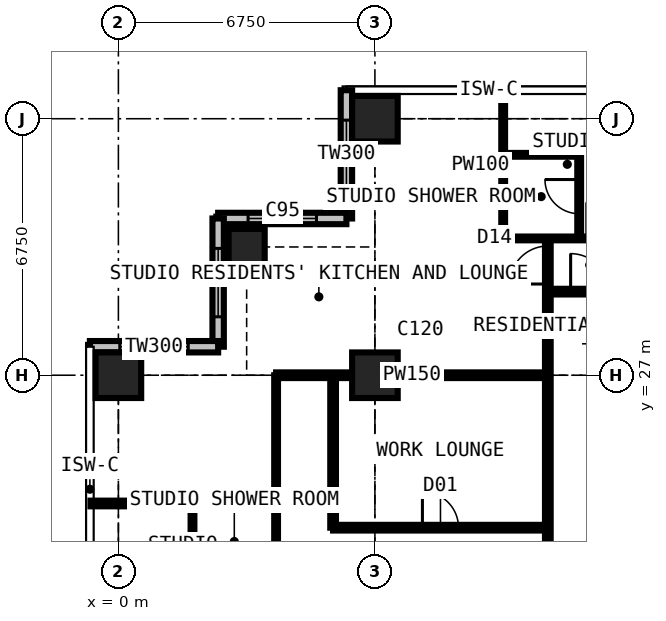
"""IFC4 building model, lengths in metres.
Left out: names, types, materials, properties, quantities, classifications, styles, units other than length and angle.
Written with IfcOpenShell. Run it as: python <this file> out.ifc"""

import sys

from ifc_helpers import new_model, si_unit, direction, frame, frame_2d, origin, origin_2d, place, context, subcontext, project, spatial, rectangle, extrude, element, fill, save


model = new_model("IFC4")
c1 = context("Model", 3, precision=1e-05, world=origin(), true_north=direction((0.0, 1.0)))
c2 = subcontext(c1, "Body", "Model", "MODEL_VIEW")
j1 = project(units=[si_unit("LENGTHUNIT", "METRE"), si_unit("PLANEANGLEUNIT", "RADIAN")], contexts=[c1])
p1 = place(None, origin())
s1 = spatial("IfcSite", under=j1, at=p1, CompositionType="ELEMENT")
p2 = place(p1, origin())
s2 = spatial("IfcBuilding", under=s1, at=p2, CompositionType="ELEMENT")
p3 = place(p2, frame((0.0, 0.0, 185.4)))
s3 = spatial("IfcBuildingStorey", under=s2, at=p3, CompositionType="ELEMENT", Elevation=185.4)
p4 = place(p3, frame((0.0, 27.0, 0.0), z_axis=(0.0, 0.0, 1.0), x_axis=(1.0, 0.0, 0.0)))
e1 = element("IfcColumn", 1, at=p4, inside=s3, PredefinedType="COLUMN", context=c2, shape_type="SweptSolid", body=[
    extrude(rectangle(XDim=1.2, YDim=1.2, at=origin_2d()), origin(), (0.0, 0.0, 1.0), 3.6),
])
p5 = place(p3, frame((3.375, 30.375, 0.0), z_axis=(0.0, 0.0, 1.0), x_axis=(1.0, 0.0, 0.0)))
e2 = element("IfcColumn", 2, at=p5, inside=s3, PredefinedType="COLUMN", context=c2, shape_type="SweptSolid", body=[
    extrude(rectangle(XDim=0.95, YDim=0.95, at=origin_2d()), origin(), (0.0, 0.0, 1.0), 3.6),
])
for number, where, z_axis, x_axis in (
    (3, (6.75, 27.0, 0.0), (0.0, 0.0, 1.0), (1.0, 0.0, 0.0)),
    (4, (6.75, 33.75, 0.0), (0.0, 0.0, 1.0), (1.0, 0.0, 0.0)),
):
    element("IfcColumn", number, at=place(p3, frame(where, z_axis=z_axis, x_axis=x_axis)), inside=s3, PredefinedType="COLUMN", context=c2, shape_type="SweptSolid", body=[
        extrude(rectangle(XDim=1.2, YDim=1.2, at=origin_2d()), origin(), (0.0, 0.0, 1.0), 3.6),
    ])
p6 = place(p3, frame((6.0, 34.5, 0.0), z_axis=(0.0, 0.0, 1.0), x_axis=(0.0, -1.0, 0.0)))
e5 = element("IfcWall", 5, at=p6, inside=s3, PredefinedType="SOLIDWALL", context=c2, shape_type="SweptSolid", body=[
    extrude(rectangle(XDim=3.375, YDim=0.3, at=frame_2d((1.688, 0.0))), origin(), (0.0, 0.0, 1.0), 3.375),
])
p7 = place(p6, frame((0.788, 0.0, 0.6)))
e6 = element("IfcOpeningElement", 6, at=p7, cuts=e5, PredefinedType="OPENING", context=c2, shape_type="SweptSolid", body=[
    extrude(rectangle(XDim=1.8, YDim=2.1, at=frame_2d((0.9, 1.05))), frame((0.0, 0.16, 0.0), z_axis=(0.0, -1.0, 0.0), x_axis=(1.0, 0.0, 0.0)), (0.0, 0.0, 1.0), 0.32),
])
p8 = place(p3, frame((6.0, 31.125, 0.0), z_axis=(0.0, 0.0, 1.0), x_axis=(-1.0, 0.0, 0.0)))
e7 = element("IfcWall", 7, at=p8, inside=s3, PredefinedType="SOLIDWALL", context=c2, shape_type="SweptSolid", body=[
    extrude(rectangle(XDim=3.375, YDim=0.3, at=frame_2d((1.688, 0.0))), origin(), (0.0, 0.0, 1.0), 3.375),
])
p9 = place(p8, frame((0.788, 0.0, 0.6)))
e8 = element("IfcOpeningElement", 8, at=p9, cuts=e7, PredefinedType="OPENING", context=c2, shape_type="SweptSolid", body=[
    extrude(rectangle(XDim=1.8, YDim=2.1, at=frame_2d((0.9, 1.05))), frame((0.0, 0.16, 0.0), z_axis=(0.0, -1.0, 0.0), x_axis=(1.0, 0.0, 0.0)), (0.0, 0.0, 1.0), 0.32),
])
p10 = place(p3, frame((2.625, 31.125, 0.0), z_axis=(0.0, 0.0, 1.0), x_axis=(0.0, -1.0, 0.0)))
e9 = element("IfcWall", 9, at=p10, inside=s3, PredefinedType="SOLIDWALL", context=c2, shape_type="SweptSolid", body=[
    extrude(rectangle(XDim=3.375, YDim=0.3, at=frame_2d((1.688, 0.0))), origin(), (0.0, 0.0, 1.0), 3.375),
])
p11 = place(p10, frame((0.788, 0.0, 0.6)))
e10 = element("IfcOpeningElement", 10, at=p11, cuts=e9, PredefinedType="OPENING", context=c2, shape_type="SweptSolid", body=[
    extrude(rectangle(XDim=1.8, YDim=2.1, at=frame_2d((0.9, 1.05))), frame((0.0, 0.16, 0.0), z_axis=(0.0, -1.0, 0.0), x_axis=(1.0, 0.0, 0.0)), (0.0, 0.0, 1.0), 0.32),
])
p12 = place(p3, frame((2.625, 27.75, 0.0), z_axis=(0.0, 0.0, 1.0), x_axis=(-1.0, 0.0, 0.0)))
e11 = element("IfcWall", 11, at=p12, inside=s3, PredefinedType="SOLIDWALL", context=c2, shape_type="SweptSolid", body=[
    extrude(rectangle(XDim=3.375, YDim=0.3, at=frame_2d((1.688, 0.0))), origin(), (0.0, 0.0, 1.0), 3.375),
])
p13 = place(p12, frame((0.788, 0.0, 0.6)))
e12 = element("IfcOpeningElement", 12, at=p13, cuts=e11, PredefinedType="OPENING", context=c2, shape_type="SweptSolid", body=[
    extrude(rectangle(XDim=1.8, YDim=2.1, at=frame_2d((0.9, 1.05))), frame((0.0, 0.16, 0.0), z_axis=(0.0, -1.0, 0.0), x_axis=(1.0, 0.0, 0.0)), (0.0, 0.0, 1.0), 0.32),
])
p14 = place(p3, frame((-0.734, 23.625, 0.0), z_axis=(0.0, 0.0, 1.0), x_axis=(1.0, 0.0, 0.0)))
e13 = element("IfcWall", 13, at=p14, inside=s3, PredefinedType="PARTITIONING", context=c2, shape_type="SweptSolid", body=[
    extrude(rectangle(XDim=4.884, YDim=0.15, at=frame_2d((2.442, 0.0))), origin(), (0.0, 0.0, 1.0), 3.375),
])
p15 = place(p3, frame((1.95, 21.625, 0.0), z_axis=(0.0, 0.0, 1.0), x_axis=(0.0, 1.0, 0.0)))
e14 = element("IfcWall", 14, at=p15, inside=s3, PredefinedType="PARTITIONING", context=c2, shape_type="SweptSolid", body=[
    extrude(rectangle(XDim=2.0, YDim=0.1, at=frame_2d((1.0, 0.0))), origin(), (0.0, 0.0, 1.0), 3.375),
])
p16 = place(p3, frame((4.15, 10.125, 0.0), z_axis=(0.0, 0.0, 1.0), x_axis=(0.0, 1.0, 0.0)))
e15 = element("IfcWall", 15, at=p16, inside=s3, PredefinedType="PARTITIONING", context=c2, shape_type="SweptSolid", body=[
    extrude(rectangle(XDim=16.875, YDim=0.1, at=frame_2d((8.438, 0.0))), origin(), (0.0, 0.0, 1.0), 3.375),
])
p17 = place(p16, frame((0.2, 0.0, 0.0)))
e16 = element("IfcOpeningElement", 16, at=p17, cuts=e15, PredefinedType="OPENING", context=c2, shape_type="SweptSolid", body=[
    extrude(rectangle(XDim=0.95, YDim=2.2, at=frame_2d((0.475, 1.1))), frame((0.0, 0.06, 0.0), z_axis=(0.0, -1.0, 0.0), x_axis=(1.0, 0.0, 0.0)), (0.0, 0.0, 1.0), 0.12),
])
p18 = place(p16, frame((3.625, 0.0, 0.0)))
e17 = element("IfcOpeningElement", 17, at=p18, cuts=e15, PredefinedType="OPENING", context=c2, shape_type="SweptSolid", body=[
    extrude(rectangle(XDim=0.95, YDim=2.2, at=frame_2d((0.475, 1.1))), frame((0.0, 0.06, 0.0), z_axis=(0.0, -1.0, 0.0), x_axis=(1.0, 0.0, 0.0)), (0.0, 0.0, 1.0), 0.12),
])
p19 = place(p16, frame((7.0, 0.0, 0.0)))
e18 = element("IfcOpeningElement", 18, at=p19, cuts=e15, PredefinedType="OPENING", context=c2, shape_type="SweptSolid", body=[
    extrude(rectangle(XDim=0.95, YDim=2.2, at=frame_2d((0.475, 1.1))), frame((0.0, 0.06, 0.0), z_axis=(0.0, -1.0, 0.0), x_axis=(1.0, 0.0, 0.0)), (0.0, 0.0, 1.0), 0.12),
])
p20 = place(p16, frame((10.375, 0.0, 0.0)))
e19 = element("IfcOpeningElement", 19, at=p20, cuts=e15, PredefinedType="OPENING", context=c2, shape_type="SweptSolid", body=[
    extrude(rectangle(XDim=0.95, YDim=2.2, at=frame_2d((0.475, 1.1))), frame((0.0, 0.06, 0.0), z_axis=(0.0, -1.0, 0.0), x_axis=(1.0, 0.0, 0.0)), (0.0, 0.0, 1.0), 0.12),
])
p21 = place(p3, frame((4.15, 27.0, 0.0), z_axis=(0.0, 0.0, 1.0), x_axis=(1.0, 0.0, 0.0)))
e20 = element("IfcWall", 20, at=p21, inside=s3, PredefinedType="PARTITIONING", context=c2, shape_type="SweptSolid", body=[
    extrude(rectangle(XDim=7.15, YDim=0.15, at=frame_2d((3.575, 0.0))), origin(), (0.0, 0.0, 1.0), 2.806),
])
p22 = place(p3, frame((5.65, 22.988, 0.0), z_axis=(0.0, 0.0, 1.0), x_axis=(0.0, 1.0, 0.0)))
e21 = element("IfcWall", 21, at=p22, inside=s3, PredefinedType="PARTITIONING", context=c2, shape_type="SweptSolid", body=[
    extrude(rectangle(XDim=4.012, YDim=0.15, at=frame_2d((2.006, 0.0))), origin(), (0.0, 0.0, 1.0), 3.375),
])
p23 = place(p3, frame((5.65, 22.988, 0.0), z_axis=(0.0, 0.0, 1.0), x_axis=(1.0, 0.0, 0.0)))
e22 = element("IfcWall", 22, at=p23, inside=s3, PredefinedType="PARTITIONING", context=c2, shape_type="SweptSolid", body=[
    extrude(rectangle(XDim=5.65, YDim=0.15, at=frame_2d((2.825, 0.0))), origin(), (0.0, 0.0, 1.0), 3.375),
])
p24 = place(p23, frame((2.35, 0.0, 0.0)))
e23 = element("IfcOpeningElement", 23, at=p24, cuts=e22, PredefinedType="OPENING", context=c2, shape_type="SweptSolid", body=[
    extrude(rectangle(XDim=0.95, YDim=2.2, at=frame_2d((0.475, 1.1))), frame((0.0, 0.085, 0.0), z_axis=(0.0, -1.0, 0.0), x_axis=(1.0, 0.0, 0.0)), (0.0, 0.0, 1.0), 0.17),
])
p25 = place(p3, frame((10.125, 30.6, 0.0), z_axis=(0.0, 0.0, 1.0), x_axis=(0.0, 1.0, 0.0)))
e24 = element("IfcWall", 24, at=p25, inside=s3, PredefinedType="PARTITIONING", context=c2, shape_type="SweptSolid", body=[
    extrude(rectangle(XDim=3.884, YDim=0.1, at=frame_2d((1.942, 0.0))), origin(), (0.0, 0.0, 1.0), 3.375),
])
p26 = place(p3, frame((10.125, 30.6, 0.0), z_axis=(0.0, 0.0, 1.0), x_axis=(1.0, 0.0, 0.0)))
e25 = element("IfcWall", 25, at=p26, inside=s3, PredefinedType="PARTITIONING", context=c2, shape_type="SweptSolid", body=[
    extrude(rectangle(XDim=3.375, YDim=0.1, at=frame_2d((1.688, 0.0))), origin(), (0.0, 0.0, 1.0), 3.375),
])
p27 = place(p26, frame((2.2, 0.0, 0.0)))
e26 = element("IfcOpeningElement", 26, at=p27, cuts=e25, PredefinedType="OPENING", context=c2, shape_type="SweptSolid", body=[
    extrude(rectangle(XDim=0.95, YDim=2.2, at=frame_2d((0.475, 1.1))), frame((0.0, 0.06, 0.0), z_axis=(0.0, -1.0, 0.0), x_axis=(1.0, 0.0, 0.0)), (0.0, 0.0, 1.0), 0.12),
])
p28 = place(p3, frame((10.125, 32.8, 0.0), z_axis=(0.0, 0.0, 1.0), x_axis=(1.0, 0.0, 0.0)))
e27 = element("IfcWall", 27, at=p28, inside=s3, PredefinedType="PARTITIONING", context=c2, shape_type="SweptSolid", body=[
    extrude(rectangle(XDim=2.0, YDim=0.1, at=frame_2d((1.0, 0.0))), origin(), (0.0, 0.0, 1.0), 3.375),
])
p29 = place(p3, frame((11.3, 11.3, 0.0), z_axis=(0.0, 0.0, 1.0), x_axis=(0.0, 1.0, 0.0)))
e28 = element("IfcWall", 28, at=p29, inside=s3, PredefinedType="PARTITIONING", context=c2, shape_type="SweptSolid", body=[
    extrude(rectangle(XDim=19.3, YDim=0.15, at=frame_2d((9.65, 0.0))), origin(), (0.0, 0.0, 1.0), 3.375),
])
p30 = place(p29, frame((18.1, 0.0, 0.0)))
e29 = element("IfcOpeningElement", 29, at=p30, cuts=e28, PredefinedType="OPENING", context=c2, shape_type="SweptSolid", body=[
    extrude(rectangle(XDim=1.0, YDim=2.2, at=frame_2d((0.5, 1.1))), frame((0.0, 0.085, 0.0), z_axis=(0.0, -1.0, 0.0), x_axis=(1.0, 0.0, 0.0)), (0.0, 0.0, 1.0), 0.17),
])
p31 = place(p29, frame((10.137, 0.0, 0.0)))
e30 = element("IfcOpeningElement", 30, at=p31, cuts=e28, PredefinedType="OPENING", context=c2, shape_type="SweptSolid", body=[
    extrude(rectangle(XDim=1.0, YDim=2.2, at=frame_2d((0.5, 1.1))), frame((0.0, 0.085, 0.0), z_axis=(0.0, -1.0, 0.0), x_axis=(1.0, 0.0, 0.0)), (0.0, 0.0, 1.0), 0.17),
])
p32 = place(p3, frame((11.3, 29.2, 0.0), z_axis=(0.0, 0.0, 1.0), x_axis=(1.0, 0.0, 0.0)))
e31 = element("IfcWall", 31, at=p32, inside=s3, PredefinedType="PARTITIONING", context=c2, shape_type="SweptSolid", body=[
    extrude(rectangle(XDim=19.809, YDim=0.15, at=frame_2d((9.904, 0.0))), origin(), (0.0, 0.0, 1.0), 3.375),
])
p33 = place(p32, frame((14.625, 0.0, 0.0)))
e32 = element("IfcOpeningElement", 32, at=p33, cuts=e31, PredefinedType="OPENING", context=c2, shape_type="SweptSolid", body=[
    extrude(rectangle(XDim=1.0, YDim=2.2, at=frame_2d((0.5, 1.1))), frame((0.0, 0.085, 0.0), z_axis=(0.0, -1.0, 0.0), x_axis=(1.0, 0.0, 0.0)), (0.0, 0.0, 1.0), 0.17),
])
p34 = place(p32, frame((5.825, 0.0, 0.0)))
e33 = element("IfcOpeningElement", 33, at=p34, cuts=e31, PredefinedType="OPENING", context=c2, shape_type="SweptSolid", body=[
    extrude(rectangle(XDim=0.95, YDim=2.2, at=frame_2d((0.475, 1.1))), frame((0.0, 0.085, 0.0), z_axis=(0.0, -1.0, 0.0), x_axis=(1.0, 0.0, 0.0)), (0.0, 0.0, 1.0), 0.17),
])
p35 = place(p32, frame((9.2, 0.0, 0.0)))
e34 = element("IfcOpeningElement", 34, at=p35, cuts=e31, PredefinedType="OPENING", context=c2, shape_type="SweptSolid", body=[
    extrude(rectangle(XDim=0.95, YDim=2.2, at=frame_2d((0.475, 1.1))), frame((0.0, 0.085, 0.0), z_axis=(0.0, -1.0, 0.0), x_axis=(1.0, 0.0, 0.0)), (0.0, 0.0, 1.0), 0.17),
])
p36 = place(p32, frame((0.6, 0.0, 0.0)))
e35 = element("IfcOpeningElement", 35, at=p36, cuts=e31, PredefinedType="OPENING", context=c2, shape_type="SweptSolid", body=[
    extrude(rectangle(XDim=1.0, YDim=2.2, at=frame_2d((0.5, 1.1))), frame((0.0, 0.085, 0.0), z_axis=(0.0, -1.0, 0.0), x_axis=(1.0, 0.0, 0.0)), (0.0, 0.0, 1.0), 0.17),
])
p37 = place(p3, frame((12.125, 30.6, 0.0), z_axis=(0.0, 0.0, 1.0), x_axis=(0.0, 1.0, 0.0)))
e36 = element("IfcWall", 36, at=p37, inside=s3, PredefinedType="PARTITIONING", context=c2, shape_type="SweptSolid", body=[
    extrude(rectangle(XDim=2.2, YDim=0.1, at=frame_2d((1.1, 0.0))), origin(), (0.0, 0.0, 1.0), 3.375),
])
p38 = place(p37, frame((0.65, 0.0, 0.0)))
e37 = element("IfcOpeningElement", 37, at=p38, cuts=e36, PredefinedType="OPENING", context=c2, shape_type="SweptSolid", body=[
    extrude(rectangle(XDim=0.9, YDim=2.2, at=frame_2d((0.45, 1.1))), frame((0.0, 0.06, 0.0), z_axis=(0.0, -1.0, 0.0), x_axis=(1.0, 0.0, 0.0)), (0.0, 0.0, 1.0), 0.12),
])
p39 = place(p7, origin())
e38 = element("IfcWindow", 38, at=p39, inside=s3, PartitioningType="SINGLE_PANEL", PredefinedType="WINDOW", context=c2, shape_type="SweptSolid", body=[
    extrude(rectangle(XDim=1.8, YDim=2.1, at=frame_2d((0.9, 1.05))), frame((0.0, 0.03, 0.0), z_axis=(0.0, -1.0, 0.0), x_axis=(1.0, 0.0, 0.0)), (0.0, 0.0, 1.0), 0.06),
])
fill(e6, e38)
p40 = place(p9, origin())
e39 = element("IfcWindow", 39, at=p40, inside=s3, PartitioningType="SINGLE_PANEL", PredefinedType="WINDOW", context=c2, shape_type="SweptSolid", body=[
    extrude(rectangle(XDim=1.8, YDim=2.1, at=frame_2d((0.9, 1.05))), frame((0.0, 0.03, 0.0), z_axis=(0.0, -1.0, 0.0), x_axis=(1.0, 0.0, 0.0)), (0.0, 0.0, 1.0), 0.06),
])
fill(e8, e39)
p41 = place(p11, origin())
e40 = element("IfcWindow", 40, at=p41, inside=s3, PartitioningType="SINGLE_PANEL", PredefinedType="WINDOW", context=c2, shape_type="SweptSolid", body=[
    extrude(rectangle(XDim=1.8, YDim=2.1, at=frame_2d((0.9, 1.05))), frame((0.0, 0.03, 0.0), z_axis=(0.0, -1.0, 0.0), x_axis=(1.0, 0.0, 0.0)), (0.0, 0.0, 1.0), 0.06),
])
fill(e10, e40)
p42 = place(p13, origin())
e41 = element("IfcWindow", 41, at=p42, inside=s3, PartitioningType="SINGLE_PANEL", PredefinedType="WINDOW", context=c2, shape_type="SweptSolid", body=[
    extrude(rectangle(XDim=1.8, YDim=2.1, at=frame_2d((0.9, 1.05))), frame((0.0, 0.03, 0.0), z_axis=(0.0, -1.0, 0.0), x_axis=(1.0, 0.0, 0.0)), (0.0, 0.0, 1.0), 0.06),
])
fill(e12, e41)
p43 = place(p38, origin())
e42 = element("IfcDoor", 42, at=p43, inside=s3, OperationType="SINGLE_SWING_RIGHT", PredefinedType="DOOR", context=c2, shape_type="SweptSolid", body=[
    extrude(rectangle(XDim=0.9, YDim=2.2, at=frame_2d((0.45, 1.1))), frame((0.0, 0.025, 0.0), z_axis=(0.0, -1.0, 0.0), x_axis=(1.0, 0.0, 0.0)), (0.0, 0.0, 1.0), 0.05),
])
fill(e37, e42)
p44 = place(p36, origin())
e43 = element("IfcDoor", 43, at=p44, inside=s3, OperationType="SINGLE_SWING_LEFT", PredefinedType="DOOR", context=c2, shape_type="SweptSolid", body=[
    extrude(rectangle(XDim=1.0, YDim=2.2, at=frame_2d((0.5, 1.1))), frame((0.0, 0.025, 0.0), z_axis=(0.0, -1.0, 0.0), x_axis=(1.0, 0.0, 0.0)), (0.0, 0.0, 1.0), 0.05),
])
fill(e35, e43)
p45 = place(p30, origin())
e44 = element("IfcDoor", 44, at=p45, inside=s3, OperationType="SINGLE_SWING_LEFT", PredefinedType="DOOR", context=c2, shape_type="SweptSolid", body=[
    extrude(rectangle(XDim=1.0, YDim=2.2, at=frame_2d((0.5, 1.1))), frame((0.0, 0.025, 0.0), z_axis=(0.0, -1.0, 0.0), x_axis=(1.0, 0.0, 0.0)), (0.0, 0.0, 1.0), 0.05),
])
fill(e29, e44)
p46 = place(p24, origin())
e45 = element("IfcDoor", 45, at=p46, inside=s3, OperationType="SINGLE_SWING_LEFT", PredefinedType="DOOR", context=c2, shape_type="SweptSolid", body=[
    extrude(rectangle(XDim=0.95, YDim=2.2, at=frame_2d((0.475, 1.1))), frame((0.0, 0.025, 0.0), z_axis=(0.0, -1.0, 0.0), x_axis=(1.0, 0.0, 0.0)), (0.0, 0.0, 1.0), 0.05),
])
fill(e23, e45)
save(model, sys.argv[1])
